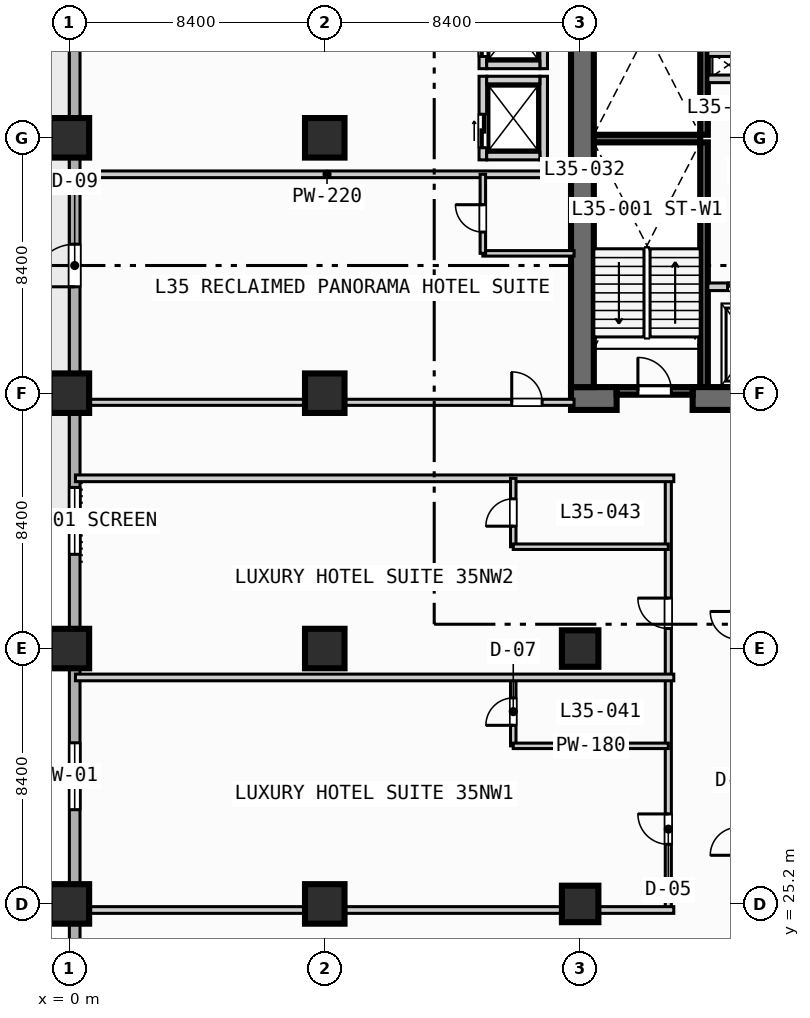
"""IFC4 building model, lengths in metres.
Left out: names, types, materials, properties, quantities, classifications, styles, units other than length and angle.
Written with IfcOpenShell. Run it as: python <this file> out.ifc"""

import sys

from ifc_helpers import new_model, si_unit, direction, frame, frame_2d, origin, origin_2d, place, context, subcontext, project, spatial, rectangle, extrude, element, fill, save


model = new_model("IFC4")
c1 = context("Model", 3, precision=1e-05, world=origin(), true_north=direction((0.0, 1.0)))
c2 = subcontext(c1, "Body", "Model", "MODEL_VIEW")
j1 = project(units=[si_unit("LENGTHUNIT", "METRE"), si_unit("PLANEANGLEUNIT", "RADIAN")], contexts=[c1])
p1 = place(None, origin())
s1 = spatial("IfcSite", under=j1, at=p1, CompositionType="ELEMENT")
p2 = place(p1, origin())
s2 = spatial("IfcBuilding", under=s1, at=p2, CompositionType="ELEMENT")
p3 = place(p2, frame((0.0, 0.0, 145.6)))
s3 = spatial("IfcBuildingStorey", under=s2, at=p3, CompositionType="ELEMENT", Elevation=145.6)
for number, where, z_axis, x_axis in (
    (1, (20.875, 42.2, 0.0), (0.0, 0.0, 1.0), (0.0, 1.0, 0.0)),
    (2, (20.875, 50.5, 0.0), (0.0, 0.0, 1.0), (0.0, 1.0, 0.0)),
):
    element("IfcWall", number, at=place(p3, frame(where, z_axis=z_axis, x_axis=x_axis)), inside=s3, PredefinedType="SOLIDWALL", context=c2, shape_type="SweptSolid", body=[
        extrude(rectangle(XDim=8.05, YDim=0.25, at=frame_2d((4.025, 0.0))), origin(), (0.0, 0.0, 1.0), 3.55),
    ])
p4 = place(p3, frame((17.25, 50.375, 0.0), z_axis=(0.0, 0.0, 1.0), x_axis=(1.0, 0.0, 0.0)))
e3 = element("IfcWall", 3, at=p4, inside=s3, PredefinedType="SOLIDWALL", context=c2, shape_type="SweptSolid", body=[
    extrude(rectangle(XDim=3.5, YDim=0.25, at=frame_2d((1.75, 0.0))), origin(), (0.0, 0.0, 1.0), 3.55),
])
p5 = place(p3, frame((16.5, 41.825, 0.0), z_axis=(0.0, 0.0, 1.0), x_axis=(1.0, 0.0, 0.0)))
e4 = element("IfcWall", 4, at=p5, inside=s3, PredefinedType="SHEAR", context=c2, shape_type="SweptSolid", body=[
    extrude(rectangle(XDim=1.5, YDim=0.75, at=frame_2d((0.75, 0.0))), origin(), (0.0, 0.0, 1.0), 3.55),
])
p6 = place(p3, frame((20.5, 41.825, 0.0), z_axis=(0.0, 0.0, 1.0), x_axis=(1.0, 0.0, 0.0)))
e5 = element("IfcWall", 5, at=p6, inside=s3, PredefinedType="SHEAR", context=c2, shape_type="SweptSolid", body=[
    extrude(rectangle(XDim=5.075, YDim=0.75, at=frame_2d((2.538, 0.0))), origin(), (0.0, 0.0, 1.0), 3.55),
])
p7 = place(p3, frame((16.875, 42.2, 0.0), z_axis=(0.0, 0.0, 1.0), x_axis=(0.0, 1.0, 0.0)))
e6 = element("IfcWall", 6, at=p7, inside=s3, PredefinedType="SHEAR", context=c2, shape_type="SweptSolid", body=[
    extrude(rectangle(XDim=16.35, YDim=0.75, at=frame_2d((8.175, 0.0))), origin(), (0.0, 0.0, 1.0), 3.55),
])
for number, where, z_axis, x_axis in (
    (7, (0.0, 25.2, 0.0), (0.0, 0.0, 1.0), (1.0, 0.0, 0.0)),
    (8, (0.0, 33.6, 0.0), (0.0, 0.0, 1.0), (1.0, 0.0, 0.0)),
    (9, (0.0, 42.0, 0.0), (0.0, 0.0, 1.0), (1.0, 0.0, 0.0)),
    (10, (0.0, 50.4, 0.0), (0.0, 0.0, 1.0), (1.0, 0.0, 0.0)),
    (11, (8.4, 25.2, 0.0), (0.0, 0.0, 1.0), (1.0, 0.0, 0.0)),
    (12, (8.4, 33.6, 0.0), (0.0, 0.0, 1.0), (1.0, 0.0, 0.0)),
    (13, (8.4, 42.0, 0.0), (0.0, 0.0, 1.0), (1.0, 0.0, 0.0)),
    (14, (8.4, 50.4, 0.0), (0.0, 0.0, 1.0), (1.0, 0.0, 0.0)),
):
    element("IfcColumn", number, at=place(p3, frame(where, z_axis=z_axis, x_axis=x_axis)), inside=s3, PredefinedType="COLUMN", context=c2, shape_type="SweptSolid", body=[
        extrude(rectangle(XDim=1.3, YDim=1.3, at=origin_2d()), origin(), (0.0, 0.0, 1.0), 3.8),
    ])
for number, where, z_axis, x_axis in (
    (15, (16.8, 25.2, 0.0), (0.0, 0.0, 1.0), (1.0, 0.0, 0.0)),
    (16, (16.8, 33.6, 0.0), (0.0, 0.0, 1.0), (1.0, 0.0, 0.0)),
):
    element("IfcColumn", number, at=place(p3, frame(where, z_axis=z_axis, x_axis=x_axis)), inside=s3, PredefinedType="COLUMN", context=c2, shape_type="SweptSolid", body=[
        extrude(rectangle(XDim=1.2, YDim=1.2, at=origin_2d()), origin(), (0.0, 0.0, 1.0), 3.8),
    ])
p8 = place(p3, frame((0.175, 3.175, 0.0), z_axis=(0.0, 0.0, 1.0), x_axis=(0.0, 1.0, 0.0)))
e17 = element("IfcWall", 17, at=p8, inside=s3, PredefinedType="STANDARD", context=c2, shape_type="SweptSolid", body=[
    extrude(rectangle(XDim=86.05, YDim=0.35, at=frame_2d((43.025, 0.0))), origin(), (0.0, 0.0, 1.0), 3.55),
])
p9 = place(p8, frame((42.325, 0.0, 0.0)))
e18 = element("IfcOpeningElement", 18, at=p9, cuts=e17, PredefinedType="OPENING", context=c2, shape_type="SweptSolid", body=[
    extrude(rectangle(XDim=1.4, YDim=2.2, at=frame_2d((0.7, 1.1))), frame((0.0, 0.185, 0.0), z_axis=(0.0, -1.0, 0.0), x_axis=(1.0, 0.0, 0.0)), (0.0, 0.0, 1.0), 0.37),
])
p10 = place(p8, frame((25.125, 0.0, 0.85)))
e19 = element("IfcOpeningElement", 19, at=p10, cuts=e17, PredefinedType="OPENING", context=c2, shape_type="SweptSolid", body=[
    extrude(rectangle(XDim=2.2, YDim=1.8, at=frame_2d((1.1, 0.9))), frame((0.0, 0.185, 0.0), z_axis=(0.0, -1.0, 0.0), x_axis=(1.0, 0.0, 0.0)), (0.0, 0.0, 1.0), 0.37),
])
p11 = place(p8, frame((33.525, 0.0, 0.85)))
e20 = element("IfcOpeningElement", 20, at=p11, cuts=e17, PredefinedType="OPENING", context=c2, shape_type="SweptSolid", body=[
    extrude(rectangle(XDim=2.2, YDim=1.8, at=frame_2d((1.1, 0.9))), frame((0.0, 0.185, 0.0), z_axis=(0.0, -1.0, 0.0), x_axis=(1.0, 0.0, 0.0)), (0.0, 0.0, 1.0), 0.37),
])
p12 = place(p8, frame((58.725, 0.0, 0.85)))
e21 = element("IfcOpeningElement", 21, at=p12, cuts=e17, PredefinedType="OPENING", context=c2, shape_type="SweptSolid", body=[
    extrude(rectangle(XDim=2.2, YDim=1.8, at=frame_2d((1.1, 0.9))), frame((0.0, 0.185, 0.0), z_axis=(0.0, -1.0, 0.0), x_axis=(1.0, 0.0, 0.0)), (0.0, 0.0, 1.0), 0.37),
])
p13 = place(p8, frame((65.125, 0.0, 0.85)))
e22 = element("IfcOpeningElement", 22, at=p13, cuts=e17, PredefinedType="OPENING", context=c2, shape_type="SweptSolid", body=[
    extrude(rectangle(XDim=1.8, YDim=1.8, at=frame_2d((0.9, 0.9))), frame((0.0, 0.185, 0.0), z_axis=(0.0, -1.0, 0.0), x_axis=(1.0, 0.0, 0.0)), (0.0, 0.0, 1.0), 0.37),
])
p14 = place(p8, frame((73.275, 0.0, 0.85)))
e23 = element("IfcOpeningElement", 23, at=p14, cuts=e17, PredefinedType="OPENING", context=c2, shape_type="SweptSolid", body=[
    extrude(rectangle(XDim=1.8, YDim=1.8, at=frame_2d((0.9, 0.9))), frame((0.0, 0.185, 0.0), z_axis=(0.0, -1.0, 0.0), x_axis=(1.0, 0.0, 0.0)), (0.0, 0.0, 1.0), 0.37),
])
p15 = place(p8, frame((81.625, 0.0, 0.85)))
e24 = element("IfcOpeningElement", 24, at=p15, cuts=e17, PredefinedType="OPENING", context=c2, shape_type="SweptSolid", body=[
    extrude(rectangle(XDim=1.8, YDim=1.8, at=frame_2d((0.9, 0.9))), frame((0.0, 0.185, 0.0), z_axis=(0.0, -1.0, 0.0), x_axis=(1.0, 0.0, 0.0)), (0.0, 0.0, 1.0), 0.37),
])
p16 = place(p3, frame((18.0, 42.075, 0.0), z_axis=(0.0, 0.0, 1.0), x_axis=(1.0, 0.0, 0.0)))
e25 = element("IfcWall", 25, at=p16, inside=s3, PredefinedType="SOLIDWALL", context=c2, shape_type="SweptSolid", body=[
    extrude(rectangle(XDim=2.5, YDim=0.25, at=frame_2d((1.25, 0.0))), origin(), (0.0, 0.0, 1.0), 3.55),
])
p17 = place(p16, frame((0.7, 0.0, 0.0)))
e26 = element("IfcOpeningElement", 26, at=p17, cuts=e25, PredefinedType="OPENING", context=c2, shape_type="SweptSolid", body=[
    extrude(rectangle(XDim=1.1, YDim=2.15, at=frame_2d((0.55, 1.075))), frame((0.0, 0.135, 0.0), z_axis=(0.0, -1.0, 0.0), x_axis=(1.0, 0.0, 0.0)), (0.0, 0.0, 1.0), 0.27),
])
p18 = place(p3, frame((21.0, 45.5, 0.0), z_axis=(0.0, 0.0, 1.0), x_axis=(1.0, 0.0, 0.0)))
e27 = element("IfcWall", 27, at=p18, inside=s3, PredefinedType="SOLIDWALL", context=c2, shape_type="SweptSolid", body=[
    extrude(rectangle(XDim=4.15, YDim=0.25, at=frame_2d((2.075, 0.0))), origin(), (0.0, 0.0, 1.0), 3.55),
])
p19 = place(p18, frame((0.65, 0.0, 0.0)))
e28 = element("IfcOpeningElement", 28, at=p19, cuts=e27, PredefinedType="OPENING", context=c2, shape_type="SweptSolid", body=[
    extrude(rectangle(XDim=1.1, YDim=2.15, at=frame_2d((0.55, 1.075))), frame((0.0, 0.135, 0.0), z_axis=(0.0, -1.0, 0.0), x_axis=(1.0, 0.0, 0.0)), (0.0, 0.0, 1.0), 0.27),
])
p20 = place(p3, frame((21.0, 52.34, 0.0), z_axis=(0.0, 0.0, 1.0), x_axis=(1.0, 0.0, 0.0)))
e29 = element("IfcWall", 29, at=p20, inside=s3, PredefinedType="SOLIDWALL", context=c2, shape_type="SweptSolid", body=[
    extrude(rectangle(XDim=3.825, YDim=0.25, at=frame_2d((1.913, 0.0))), origin(), (0.0, 0.0, 1.0), 3.55),
])
p21 = place(p3, frame((21.0, 53.2, 0.0), z_axis=(0.0, 0.0, 1.0), x_axis=(1.0, 0.0, 0.0)))
e30 = element("IfcWall", 30, at=p21, inside=s3, PredefinedType="SOLIDWALL", context=c2, shape_type="SweptSolid", body=[
    extrude(rectangle(XDim=1.3, YDim=0.25, at=frame_2d((0.65, 0.0))), origin(), (0.0, 0.0, 1.0), 3.55),
])
p22 = place(p3, frame((13.6, 49.675, 0.0), z_axis=(0.0, 0.0, 1.0), x_axis=(0.0, 1.0, 0.0)))
e31 = element("IfcWall", 31, at=p22, inside=s3, PredefinedType="SOLIDWALL", context=c2, shape_type="SweptSolid", body=[
    extrude(rectangle(XDim=2.75, YDim=0.25, at=frame_2d((1.375, 0.0))), origin(), (0.0, 0.0, 1.0), 3.55),
])
p23 = place(p22, frame((0.4, 0.0, 0.0)))
e32 = element("IfcOpeningElement", 32, at=p23, cuts=e31, PredefinedType="OPENING", context=c2, shape_type="SweptSolid", body=[
    extrude(rectangle(XDim=1.1, YDim=2.15, at=frame_2d((0.55, 1.075))), frame((0.0, 0.135, 0.0), z_axis=(0.0, -1.0, 0.0), x_axis=(1.0, 0.0, 0.0)), (0.0, 0.0, 1.0), 0.27),
])
p24 = place(p3, frame((15.6, 49.675, 0.0), z_axis=(0.0, 0.0, 1.0), x_axis=(0.0, 1.0, 0.0)))
e33 = element("IfcWall", 33, at=p24, inside=s3, PredefinedType="SOLIDWALL", context=c2, shape_type="SweptSolid", body=[
    extrude(rectangle(XDim=2.75, YDim=0.25, at=frame_2d((1.375, 0.0))), origin(), (0.0, 0.0, 1.0), 3.55),
])
for number, where, z_axis, x_axis in (
    (34, (13.725, 49.8, 0.0), (0.0, 0.0, 1.0), (1.0, 0.0, 0.0)),
    (35, (13.725, 52.3, 0.0), (0.0, 0.0, 1.0), (1.0, 0.0, 0.0)),
):
    element("IfcWall", number, at=place(p3, frame(where, z_axis=z_axis, x_axis=x_axis)), inside=s3, PredefinedType="SOLIDWALL", context=c2, shape_type="SweptSolid", body=[
        extrude(rectangle(XDim=1.75, YDim=0.25, at=frame_2d((0.875, 0.0))), origin(), (0.0, 0.0, 1.0), 3.55),
    ])
p25 = place(p3, frame((13.6, 52.675, 0.0), z_axis=(0.0, 0.0, 1.0), x_axis=(0.0, 1.0, 0.0)))
e36 = element("IfcWall", 36, at=p25, inside=s3, PredefinedType="SOLIDWALL", context=c2, shape_type="SweptSolid", body=[
    extrude(rectangle(XDim=2.75, YDim=0.25, at=frame_2d((1.375, 0.0))), origin(), (0.0, 0.0, 1.0), 3.55),
])
p26 = place(p25, frame((0.4, 0.0, 0.0)))
e37 = element("IfcOpeningElement", 37, at=p26, cuts=e36, PredefinedType="OPENING", context=c2, shape_type="SweptSolid", body=[
    extrude(rectangle(XDim=1.1, YDim=2.15, at=frame_2d((0.55, 1.075))), frame((0.0, 0.135, 0.0), z_axis=(0.0, -1.0, 0.0), x_axis=(1.0, 0.0, 0.0)), (0.0, 0.0, 1.0), 0.27),
])
p27 = place(p3, frame((15.6, 52.675, 0.0), z_axis=(0.0, 0.0, 1.0), x_axis=(0.0, 1.0, 0.0)))
e38 = element("IfcWall", 38, at=p27, inside=s3, PredefinedType="SOLIDWALL", context=c2, shape_type="SweptSolid", body=[
    extrude(rectangle(XDim=2.75, YDim=0.25, at=frame_2d((1.375, 0.0))), origin(), (0.0, 0.0, 1.0), 3.55),
])
p28 = place(p3, frame((13.725, 52.8, 0.0), z_axis=(0.0, 0.0, 1.0), x_axis=(1.0, 0.0, 0.0)))
e39 = element("IfcWall", 39, at=p28, inside=s3, PredefinedType="SOLIDWALL", context=c2, shape_type="SweptSolid", body=[
    extrude(rectangle(XDim=1.75, YDim=0.25, at=frame_2d((0.875, 0.0))), origin(), (0.0, 0.0, 1.0), 3.55),
])
p29 = place(p3, frame((0.35, 41.7, 0.0), z_axis=(0.0, 0.0, 1.0), x_axis=(1.0, 0.0, 0.0)))
e40 = element("IfcWall", 40, at=p29, inside=s3, PredefinedType="PARTITIONING", context=c2, shape_type="SweptSolid", body=[
    extrude(rectangle(XDim=16.25, YDim=0.2, at=frame_2d((8.125, 0.0))), origin(), (0.0, 0.0, 1.0), 2.8),
])
p30 = place(p29, frame((14.2, 0.0, 0.0)))
e41 = element("IfcOpeningElement", 41, at=p30, cuts=e40, PredefinedType="OPENING", context=c2, shape_type="SweptSolid", body=[
    extrude(rectangle(XDim=1.0, YDim=2.15, at=frame_2d((0.5, 1.075))), frame((0.0, 0.11, 0.0), z_axis=(0.0, -1.0, 0.0), x_axis=(1.0, 0.0, 0.0)), (0.0, 0.0, 1.0), 0.22),
])
p31 = place(p3, frame((0.35, 49.2, 0.0), z_axis=(0.0, 0.0, 1.0), x_axis=(1.0, 0.0, 0.0)))
e42 = element("IfcWall", 42, at=p31, inside=s3, PredefinedType="PARTITIONING", context=c2, shape_type="SweptSolid", body=[
    extrude(rectangle(XDim=16.25, YDim=0.22, at=frame_2d((8.125, 0.0))), origin(), (0.0, 0.0, 1.0), 3.55),
])
p32 = place(p3, frame((13.6, 46.6, 0.0), z_axis=(0.0, 0.0, 1.0), x_axis=(1.0, 0.0, 0.0)))
e43 = element("IfcWall", 43, at=p32, inside=s3, PredefinedType="PLUMBINGWALL", context=c2, shape_type="SweptSolid", body=[
    extrude(rectangle(XDim=3.0, YDim=0.18, at=frame_2d((1.5, 0.0))), origin(), (0.0, 0.0, 1.0), 3.55),
])
p33 = place(p3, frame((13.6, 46.6, 0.0), z_axis=(0.0, 0.0, 1.0), x_axis=(0.0, 1.0, 0.0)))
e44 = element("IfcWall", 44, at=p33, inside=s3, PredefinedType="PLUMBINGWALL", context=c2, shape_type="SweptSolid", body=[
    extrude(rectangle(XDim=2.6, YDim=0.18, at=frame_2d((1.3, 0.0))), origin(), (0.0, 0.0, 1.0), 3.55),
])
p34 = place(p33, frame((0.7, 0.0, 0.0)))
e45 = element("IfcOpeningElement", 45, at=p34, cuts=e44, PredefinedType="OPENING", context=c2, shape_type="SweptSolid", body=[
    extrude(rectangle(XDim=0.9, YDim=2.1, at=frame_2d((0.45, 1.05))), frame((0.0, 0.1, 0.0), z_axis=(0.0, -1.0, 0.0), x_axis=(1.0, 0.0, 0.0)), (0.0, 0.0, 1.0), 0.2),
])
p35 = place(p3, frame((19.7, 25.0, 0.0), z_axis=(0.0, 0.0, 1.0), x_axis=(0.0, 1.0, 0.0)))
e46 = element("IfcWall", 46, at=p35, inside=s3, PredefinedType="PARTITIONING", context=c2, shape_type="SweptSolid", body=[
    extrude(rectangle(XDim=14.2, YDim=0.2, at=frame_2d((7.1, 0.0))), origin(), (0.0, 0.0, 1.0), 3.55),
])
p36 = place(p35, frame((2.16, 0.0, 0.0)))
e47 = element("IfcOpeningElement", 47, at=p36, cuts=e46, PredefinedType="OPENING", context=c2, shape_type="SweptSolid", body=[
    extrude(rectangle(XDim=1.0, YDim=2.15, at=frame_2d((0.5, 1.075))), frame((0.0, 0.11, 0.0), z_axis=(0.0, -1.0, 0.0), x_axis=(1.0, 0.0, 0.0)), (0.0, 0.0, 1.0), 0.22),
])
p37 = place(p35, frame((9.26, 0.0, 0.0)))
e48 = element("IfcOpeningElement", 48, at=p37, cuts=e46, PredefinedType="OPENING", context=c2, shape_type="SweptSolid", body=[
    extrude(rectangle(XDim=1.0, YDim=2.15, at=frame_2d((0.5, 1.075))), frame((0.0, 0.11, 0.0), z_axis=(0.0, -1.0, 0.0), x_axis=(1.0, 0.0, 0.0)), (0.0, 0.0, 1.0), 0.22),
])
p38 = place(p3, frame((0.2, 25.0, 0.0), z_axis=(0.0, 0.0, 1.0), x_axis=(1.0, 0.0, 0.0)))
e49 = element("IfcWall", 49, at=p38, inside=s3, PredefinedType="PARTITIONING", context=c2, shape_type="SweptSolid", body=[
    extrude(rectangle(XDim=19.68, YDim=0.22, at=frame_2d((9.84, 0.0))), origin(), (0.0, 0.0, 1.0), 2.8),
])
p39 = place(p3, frame((14.6, 30.4, 0.0), z_axis=(0.0, 0.0, 1.0), x_axis=(0.0, 1.0, 0.0)))
e50 = element("IfcWall", 50, at=p39, inside=s3, PredefinedType="PLUMBINGWALL", context=c2, shape_type="SweptSolid", body=[
    extrude(rectangle(XDim=2.25, YDim=0.18, at=frame_2d((1.125, 0.0))), origin(), (0.0, 0.0, 1.0), 3.55),
])
p40 = place(p39, frame((0.675, 0.0, 0.0)))
e51 = element("IfcOpeningElement", 51, at=p40, cuts=e50, PredefinedType="OPENING", context=c2, shape_type="SweptSolid", body=[
    extrude(rectangle(XDim=0.9, YDim=2.1, at=frame_2d((0.45, 1.05))), frame((0.0, 0.1, 0.0), z_axis=(0.0, -1.0, 0.0), x_axis=(1.0, 0.0, 0.0)), (0.0, 0.0, 1.0), 0.2),
])
p41 = place(p3, frame((14.6, 30.4, 0.0), z_axis=(0.0, 0.0, 1.0), x_axis=(1.0, 0.0, 0.0)))
e52 = element("IfcWall", 52, at=p41, inside=s3, PredefinedType="PLUMBINGWALL", context=c2, shape_type="SweptSolid", body=[
    extrude(rectangle(XDim=5.1, YDim=0.18, at=frame_2d((2.55, 0.0))), origin(), (0.0, 0.0, 1.0), 3.55),
])
for number, where, z_axis, x_axis in (
    (53, (0.2, 32.65, 0.0), (0.0, 0.0, 1.0), (1.0, 0.0, 0.0)),
    (54, (0.2, 39.2, 0.0), (0.0, 0.0, 1.0), (1.0, 0.0, 0.0)),
):
    element("IfcWall", number, at=place(p3, frame(where, z_axis=z_axis, x_axis=x_axis)), inside=s3, PredefinedType="PARTITIONING", context=c2, shape_type="SweptSolid", body=[
        extrude(rectangle(XDim=19.68, YDim=0.22, at=frame_2d((9.84, 0.0))), origin(), (0.0, 0.0, 1.0), 3.55),
    ])
p42 = place(p3, frame((14.6, 36.95, 0.0), z_axis=(0.0, 0.0, 1.0), x_axis=(0.0, 1.0, 0.0)))
e55 = element("IfcWall", 55, at=p42, inside=s3, PredefinedType="PLUMBINGWALL", context=c2, shape_type="SweptSolid", body=[
    extrude(rectangle(XDim=2.25, YDim=0.18, at=frame_2d((1.125, 0.0))), origin(), (0.0, 0.0, 1.0), 3.55),
])
p43 = place(p42, frame((0.675, 0.0, 0.0)))
e56 = element("IfcOpeningElement", 56, at=p43, cuts=e55, PredefinedType="OPENING", context=c2, shape_type="SweptSolid", body=[
    extrude(rectangle(XDim=0.9, YDim=2.1, at=frame_2d((0.45, 1.05))), frame((0.0, 0.1, 0.0), z_axis=(0.0, -1.0, 0.0), x_axis=(1.0, 0.0, 0.0)), (0.0, 0.0, 1.0), 0.2),
])
p44 = place(p3, frame((14.6, 36.95, 0.0), z_axis=(0.0, 0.0, 1.0), x_axis=(1.0, 0.0, 0.0)))
e57 = element("IfcWall", 57, at=p44, inside=s3, PredefinedType="PLUMBINGWALL", context=c2, shape_type="SweptSolid", body=[
    extrude(rectangle(XDim=5.1, YDim=0.18, at=frame_2d((2.55, 0.0))), origin(), (0.0, 0.0, 1.0), 3.55),
])
p45 = place(p9, origin())
e58 = element("IfcDoor", 58, at=p45, inside=s3, OperationType="SINGLE_SWING_LEFT", PredefinedType="DOOR", context=c2, shape_type="SweptSolid", body=[
    extrude(rectangle(XDim=1.4, YDim=2.2, at=frame_2d((0.7, 1.1))), frame((0.0, 0.025, 0.0), z_axis=(0.0, -1.0, 0.0), x_axis=(1.0, 0.0, 0.0)), (0.0, 0.0, 1.0), 0.05),
])
fill(e18, e58)
p46 = place(p10, origin())
e59 = element("IfcWindow", 59, at=p46, inside=s3, PartitioningType="SINGLE_PANEL", PredefinedType="WINDOW", context=c2, shape_type="SweptSolid", body=[
    extrude(rectangle(XDim=2.2, YDim=1.8, at=frame_2d((1.1, 0.9))), frame((0.0, 0.03, 0.0), z_axis=(0.0, -1.0, 0.0), x_axis=(1.0, 0.0, 0.0)), (0.0, 0.0, 1.0), 0.06),
])
fill(e19, e59)
p47 = place(p11, origin())
e60 = element("IfcWindow", 60, at=p47, inside=s3, PartitioningType="SINGLE_PANEL", PredefinedType="WINDOW", context=c2, shape_type="SweptSolid", body=[
    extrude(rectangle(XDim=2.2, YDim=1.8, at=frame_2d((1.1, 0.9))), frame((0.0, 0.03, 0.0), z_axis=(0.0, -1.0, 0.0), x_axis=(1.0, 0.0, 0.0)), (0.0, 0.0, 1.0), 0.06),
])
fill(e20, e60)
p48 = place(p17, origin())
e61 = element("IfcDoor", 61, at=p48, inside=s3, OperationType="SINGLE_SWING_LEFT", PredefinedType="DOOR", context=c2, shape_type="SweptSolid", body=[
    extrude(rectangle(XDim=1.1, YDim=2.15, at=frame_2d((0.55, 1.075))), frame((0.0, 0.025, 0.0), z_axis=(0.0, -1.0, 0.0), x_axis=(1.0, 0.0, 0.0)), (0.0, 0.0, 1.0), 0.05),
])
fill(e26, e61)
p49 = place(p19, origin())
e62 = element("IfcDoor", 62, at=p49, inside=s3, OperationType="SLIDING_TO_LEFT", PredefinedType="DOOR", context=c2, shape_type="SweptSolid", body=[
    extrude(rectangle(XDim=1.1, YDim=2.15, at=frame_2d((0.55, 1.075))), frame((0.0, 0.025, 0.0), z_axis=(0.0, -1.0, 0.0), x_axis=(1.0, 0.0, 0.0)), (0.0, 0.0, 1.0), 0.05),
])
fill(e28, e62)
p50 = place(p23, origin())
e63 = element("IfcDoor", 63, at=p50, inside=s3, OperationType="SLIDING_TO_LEFT", PredefinedType="DOOR", context=c2, shape_type="SweptSolid", body=[
    extrude(rectangle(XDim=1.1, YDim=2.15, at=frame_2d((0.55, 1.075))), frame((0.0, 0.025, 0.0), z_axis=(0.0, -1.0, 0.0), x_axis=(1.0, 0.0, 0.0)), (0.0, 0.0, 1.0), 0.05),
])
fill(e32, e63)
p51 = place(p26, origin())
e64 = element("IfcDoor", 64, at=p51, inside=s3, OperationType="SLIDING_TO_LEFT", PredefinedType="DOOR", context=c2, shape_type="SweptSolid", body=[
    extrude(rectangle(XDim=1.1, YDim=2.15, at=frame_2d((0.55, 1.075))), frame((0.0, 0.025, 0.0), z_axis=(0.0, -1.0, 0.0), x_axis=(1.0, 0.0, 0.0)), (0.0, 0.0, 1.0), 0.05),
])
fill(e37, e64)
p52 = place(p30, origin())
e65 = element("IfcDoor", 65, at=p52, inside=s3, OperationType="SINGLE_SWING_LEFT", PredefinedType="DOOR", context=c2, shape_type="SweptSolid", body=[
    extrude(rectangle(XDim=1.0, YDim=2.15, at=frame_2d((0.5, 1.075))), frame((0.0, 0.025, 0.0), z_axis=(0.0, -1.0, 0.0), x_axis=(1.0, 0.0, 0.0)), (0.0, 0.0, 1.0), 0.05),
])
fill(e41, e65)
p53 = place(p34, origin())
e66 = element("IfcDoor", 66, at=p53, inside=s3, OperationType="SINGLE_SWING_RIGHT", PredefinedType="DOOR", context=c2, shape_type="SweptSolid", body=[
    extrude(rectangle(XDim=0.9, YDim=2.1, at=frame_2d((0.45, 1.05))), frame((0.0, 0.025, 0.0), z_axis=(0.0, -1.0, 0.0), x_axis=(1.0, 0.0, 0.0)), (0.0, 0.0, 1.0), 0.05),
])
fill(e45, e66)
p54 = place(p36, origin())
e67 = element("IfcDoor", 67, at=p54, inside=s3, OperationType="SINGLE_SWING_RIGHT", PredefinedType="DOOR", context=c2, shape_type="SweptSolid", body=[
    extrude(rectangle(XDim=1.0, YDim=2.15, at=frame_2d((0.5, 1.075))), frame((0.0, 0.025, 0.0), z_axis=(0.0, -1.0, 0.0), x_axis=(1.0, 0.0, 0.0)), (0.0, 0.0, 1.0), 0.05),
])
fill(e47, e67)
p55 = place(p37, origin())
e68 = element("IfcDoor", 68, at=p55, inside=s3, OperationType="SINGLE_SWING_RIGHT", PredefinedType="DOOR", context=c2, shape_type="SweptSolid", body=[
    extrude(rectangle(XDim=1.0, YDim=2.15, at=frame_2d((0.5, 1.075))), frame((0.0, 0.025, 0.0), z_axis=(0.0, -1.0, 0.0), x_axis=(1.0, 0.0, 0.0)), (0.0, 0.0, 1.0), 0.05),
])
fill(e48, e68)
p56 = place(p40, origin())
e69 = element("IfcDoor", 69, at=p56, inside=s3, OperationType="SINGLE_SWING_LEFT", PredefinedType="DOOR", context=c2, shape_type="SweptSolid", body=[
    extrude(rectangle(XDim=0.9, YDim=2.1, at=frame_2d((0.45, 1.05))), frame((0.0, 0.025, 0.0), z_axis=(0.0, -1.0, 0.0), x_axis=(1.0, 0.0, 0.0)), (0.0, 0.0, 1.0), 0.05),
])
fill(e51, e69)
p57 = place(p43, origin())
e70 = element("IfcDoor", 70, at=p57, inside=s3, OperationType="SINGLE_SWING_LEFT", PredefinedType="DOOR", context=c2, shape_type="SweptSolid", body=[
    extrude(rectangle(XDim=0.9, YDim=2.1, at=frame_2d((0.45, 1.05))), frame((0.0, 0.025, 0.0), z_axis=(0.0, -1.0, 0.0), x_axis=(1.0, 0.0, 0.0)), (0.0, 0.0, 1.0), 0.05),
])
fill(e56, e70)
save(model, sys.argv[1])
